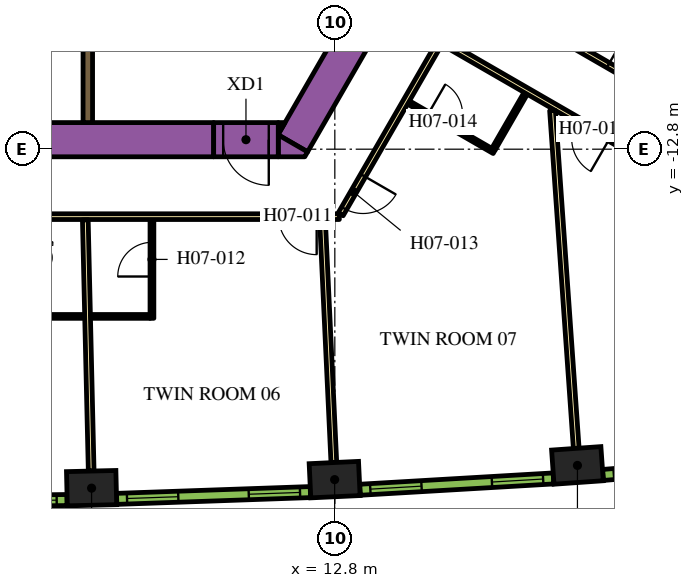
"""IFC4 building model, lengths in metres.
Left out: names, types, materials, properties, quantities, classifications, styles, units other than length and angle.
Written with IfcOpenShell. Run it as: python <this file> out.ifc"""

import sys

from ifc_helpers import new_model, si_unit, direction, frame, frame_2d, origin, origin_2d, place, context, subcontext, project, spatial, polyline, rectangle, outline, extrude, element, fill, save


model = new_model("IFC4")
c1 = context("Model", 3, precision=1e-05, world=origin(), true_north=direction((0.0, 1.0)))
c2 = subcontext(c1, "Body", "Model", "MODEL_VIEW")
j1 = project(units=[si_unit("LENGTHUNIT", "METRE"), si_unit("PLANEANGLEUNIT", "RADIAN")], contexts=[c1])
p1 = place(None, origin())
s1 = spatial("IfcSite", under=j1, at=p1, CompositionType="ELEMENT")
p2 = place(p1, origin())
s2 = spatial("IfcBuilding", under=s1, at=p2, CompositionType="ELEMENT")
p3 = place(p2, frame((0.0, 0.0, 99.3)))
s3 = spatial("IfcBuildingStorey", under=s2, at=p3, CompositionType="ELEMENT", Elevation=99.3)
for number, where, z_axis, x_axis in (
    (1, (6.399, -21.719, 0.0), (0.0, 0.0, 1.0), (1.0, 0.023, 0.0)),
    (2, (12.795, -21.494, 0.0), (0.0, 0.0, 1.0), (0.999, 0.047, 0.0)),
    (3, (19.184, -21.12, 0.0), (0.0, 0.0, 1.0), (0.998, 0.07, 0.0)),
):
    element("IfcColumn", number, at=place(p3, frame(where, z_axis=z_axis, x_axis=x_axis)), inside=s3, PredefinedType="COLUMN", context=c2, shape_type="SweptSolid", body=[
        extrude(rectangle(XDim=1.3, YDim=0.9, at=origin_2d()), origin(), (0.0, 0.0, 1.0), 3.9),
    ])
p4 = place(p3, frame((11.695, -12.644, 0.0), z_axis=(0.0, 0.0, 1.0), x_axis=(0.500010229568, 0.86601949766, 0.0)))
e4 = element("IfcWall", 4, at=p4, inside=s3, PredefinedType="SOLIDWALL", context=c2, shape_type="SweptSolid", body=[
    extrude(rectangle(XDim=9.326, YDim=0.9, at=frame_2d((4.663, 0.0))), origin(), (0.0, 0.0, 1.0), 3.9),
])
p5 = place(p3, origin())
e5 = element("IfcWall", 5, at=p5, inside=s3, PredefinedType="SOLIDWALL", context=c2, shape_type="SweptSolid", body=[
    extrude(outline(polyline([(12.009, -13.0), (11.312, -13.0), (11.312, -12.425), (12.083, -12.871), (12.009, -13.0)])), origin(), (0.0, 0.0, 1.0), 3.9),
])
e6 = element("IfcWall", 6, at=p5, inside=s3, PredefinedType="SOLIDWALL", context=c2, shape_type="SweptSolid", body=[
    extrude(outline(polyline([(11.489, -12.1), (11.312, -12.407), (11.312, -12.1), (11.489, -12.1)])), origin(), (0.0, 0.0, 1.0), 3.9),
])
p6 = place(p3, frame((-12.019, -12.55, 0.0), z_axis=(0.0, 0.0, 1.0), x_axis=(1.0, 0.0, 0.0)))
e7 = element("IfcWall", 7, at=p6, inside=s3, PredefinedType="SOLIDWALL", context=c2, shape_type="SweptSolid", body=[
    extrude(rectangle(XDim=21.63, YDim=0.9, at=frame_2d((10.815, 0.0))), origin(), (0.0, 0.0, 1.0), 3.9),
])
p7 = place(p3, frame((6.3, -8.67, 0.0), z_axis=(0.0, 0.0, 1.0), x_axis=(0.0, -1.0, 0.0)))
e8 = element("IfcWall", 8, at=p7, inside=s3, PredefinedType="SOLIDWALL", context=c2, shape_type="SweptSolid", body=[
    extrude(rectangle(XDim=3.43, YDim=0.25, at=frame_2d((1.715, 0.0))), origin(), (0.0, 0.0, 1.0), 3.9),
])
p8 = place(p3, frame((11.312, -12.55, 0.0), z_axis=(0.0, 0.0, 1.0), x_axis=(-1.0, 0.0, 0.0)))
e9 = element("IfcWall", 9, at=p8, inside=s3, PredefinedType="SOLIDWALL", context=c2, shape_type="SweptSolid", body=[
    extrude(rectangle(XDim=1.7, YDim=0.9, at=frame_2d((0.85, 0.0))), origin(), (0.0, 0.0, 1.0), 3.9),
])
p9 = place(p8, frame((0.25, 0.0, 0.0)))
e10 = element("IfcOpeningElement", 10, at=p9, cuts=e9, PredefinedType="OPENING", context=c2, shape_type="SweptSolid", body=[
    extrude(rectangle(XDim=1.2, YDim=2.1, at=frame_2d((0.6, 1.05))), frame((0.0, 0.46, 0.0), z_axis=(0.0, -1.0, 0.0), x_axis=(1.0, 0.0, 0.0)), (0.0, 0.0, 1.0), 0.92),
])
p10 = place(p3, frame((16.412, -8.523, 0.0), z_axis=(0.0, 0.0, 1.0), x_axis=(0.866025629663, -0.499999608766, 0.0)))
e11 = element("IfcWall", 11, at=p10, inside=s3, PredefinedType="PARTITIONING", context=c2, shape_type="SweptSolid", body=[
    extrude(rectangle(XDim=13.624, YDim=0.15, at=frame_2d((6.812, 0.0))), origin(), (0.0, 0.0, 1.0), 2.75),
])
p11 = place(p10, frame((4.134, 0.0, 0.0)))
e12 = element("IfcOpeningElement", 12, at=p11, cuts=e11, PredefinedType="OPENING", context=c2, shape_type="SweptSolid", body=[
    extrude(rectangle(XDim=1.0, YDim=2.1, at=frame_2d((0.5, 1.05))), frame((0.0, 0.085, 0.0), z_axis=(0.0, -1.0, 0.0), x_axis=(1.0, 0.0, 0.0)), (0.0, 0.0, 1.0), 0.17),
])
p12 = place(p3, frame((12.918, -14.575, 0.0), z_axis=(0.0, 0.0, 1.0), x_axis=(-1.0, 0.0, 0.0)))
e13 = element("IfcWall", 13, at=p12, inside=s3, PredefinedType="PARTITIONING", context=c2, shape_type="SweptSolid", body=[
    extrude(rectangle(XDim=25.766, YDim=0.15, at=frame_2d((12.883, 0.0))), origin(), (0.0, 0.0, 1.0), 2.75),
])
p13 = place(p12, frame((24.24, 0.0, 0.0)))
e14 = element("IfcOpeningElement", 14, at=p13, cuts=e13, PredefinedType="OPENING", context=c2, shape_type="SweptSolid", body=[
    extrude(rectangle(XDim=1.0, YDim=2.1, at=frame_2d((0.5, 1.05))), frame((0.0, 0.085, 0.0), z_axis=(0.0, -1.0, 0.0), x_axis=(1.0, 0.0, 0.0)), (0.0, 0.0, 1.0), 0.17),
])
p14 = place(p12, frame((13.144, 0.0, 0.0)))
e15 = element("IfcOpeningElement", 15, at=p14, cuts=e13, PredefinedType="OPENING", context=c2, shape_type="SweptSolid", body=[
    extrude(rectangle(XDim=1.0, YDim=2.1, at=frame_2d((0.5, 1.05))), frame((0.0, 0.085, 0.0), z_axis=(0.0, -1.0, 0.0), x_axis=(1.0, 0.0, 0.0)), (0.0, 0.0, 1.0), 0.17),
])
p15 = place(p12, frame((11.693, 0.0, 0.0)))
e16 = element("IfcOpeningElement", 16, at=p15, cuts=e13, PredefinedType="OPENING", context=c2, shape_type="SweptSolid", body=[
    extrude(rectangle(XDim=1.0, YDim=2.1, at=frame_2d((0.5, 1.05))), frame((0.0, 0.085, 0.0), z_axis=(0.0, -1.0, 0.0), x_axis=(1.0, 0.0, 0.0)), (0.0, 0.0, 1.0), 0.17),
])
p16 = place(p12, frame((0.596, 0.0, 0.0)))
e17 = element("IfcOpeningElement", 17, at=p16, cuts=e13, PredefinedType="OPENING", context=c2, shape_type="SweptSolid", body=[
    extrude(rectangle(XDim=1.0, YDim=2.1, at=frame_2d((0.5, 1.05))), frame((0.0, 0.085, 0.0), z_axis=(0.0, -1.0, 0.0), x_axis=(1.0, 0.0, 0.0)), (0.0, 0.0, 1.0), 0.17),
])
p17 = place(p3, frame((15.587, -9.952, 0.0), z_axis=(0.0, 0.0, 1.0), x_axis=(-0.500016618951, -0.866015808616, 0.0)))
e18 = element("IfcWall", 18, at=p17, inside=s3, PredefinedType="PARTITIONING", context=c2, shape_type="SweptSolid", body=[
    extrude(rectangle(XDim=5.268, YDim=0.15, at=frame_2d((2.634, 0.0))), origin(), (0.0, 0.0, 1.0), 2.75),
])
p18 = place(p17, frame((4.088, 0.0, 0.0)))
e19 = element("IfcOpeningElement", 19, at=p18, cuts=e18, PredefinedType="OPENING", context=c2, shape_type="SweptSolid", body=[
    extrude(rectangle(XDim=1.0, YDim=2.1, at=frame_2d((0.5, 1.05))), frame((0.0, 0.085, 0.0), z_axis=(0.0, -1.0, 0.0), x_axis=(1.0, 0.0, 0.0)), (0.0, 0.0, 1.0), 0.17),
])
p19 = place(p3, frame((27.386, -16.764, 0.0), z_axis=(0.0, 0.0, 1.0), x_axis=(-0.866022585856, 0.500004880763, 0.0)))
e20 = element("IfcWall", 20, at=p19, inside=s3, PredefinedType="PARTITIONING", context=c2, shape_type="SweptSolid", body=[
    extrude(rectangle(XDim=13.544, YDim=0.15, at=frame_2d((6.772, 0.0))), origin(), (0.0, 0.0, 1.0), 2.75),
])
p20 = place(p19, frame((8.491, 0.0, 0.0)))
e21 = element("IfcOpeningElement", 21, at=p20, cuts=e20, PredefinedType="OPENING", context=c2, shape_type="SweptSolid", body=[
    extrude(rectangle(XDim=1.0, YDim=2.1, at=frame_2d((0.5, 1.05))), frame((0.0, 0.085, 0.0), z_axis=(0.0, -1.0, 0.0), x_axis=(1.0, 0.0, 0.0)), (0.0, 0.0, 1.0), 0.17),
])
p21 = place(p3, frame((6.389, -21.269, 0.0), z_axis=(0.0, 0.0, 1.0), x_axis=(-0.023377429176, 0.999726710559, 0.0)))
e22 = element("IfcWall", 22, at=p21, inside=s3, PredefinedType="PARTITIONING", context=c2, shape_type="SweptSolid", body=[
    extrude(rectangle(XDim=6.611, YDim=0.15, at=frame_2d((3.305, 0.0))), origin(), (0.0, 0.0, 1.0), 2.75),
])
p22 = place(p3, frame((12.774, -21.045, 0.0), z_axis=(0.0, 0.0, 1.0), x_axis=(-0.046750341626, 0.998906605023, 0.0)))
e23 = element("IfcWall", 23, at=p22, inside=s3, PredefinedType="PARTITIONING", context=c2, shape_type="SweptSolid", body=[
    extrude(rectangle(XDim=6.392, YDim=0.15, at=frame_2d((3.196, 0.0))), origin(), (0.0, 0.0, 1.0), 2.75),
])
p23 = place(p3, frame((19.153, -20.671, 0.0), z_axis=(0.0, 0.0, 1.0), x_axis=(-0.070070736723, 0.997542025107, 0.0)))
e24 = element("IfcWall", 24, at=p23, inside=s3, PredefinedType="PARTITIONING", context=c2, shape_type="SweptSolid", body=[
    extrude(rectangle(XDim=8.909, YDim=0.15, at=frame_2d((4.455, 0.0))), origin(), (0.0, 0.0, 1.0), 2.75),
])
p24 = place(p3, frame((4.53, -17.2, 0.0), z_axis=(0.0, 0.0, 1.0), x_axis=(1.0, 0.0, 0.0)))
e25 = element("IfcWall", 25, at=p24, inside=s3, PredefinedType="PARTITIONING", context=c2, shape_type="SweptSolid", body=[
    extrude(rectangle(XDim=1.68, YDim=0.1, at=frame_2d((0.84, 0.0))), origin(), (0.0, 0.0, 1.0), 2.75),
])
p25 = place(p3, frame((7.988, -17.25, 0.0), z_axis=(0.0, 0.0, 1.0), x_axis=(0.0, 1.0, 0.0)))
e26 = element("IfcWall", 26, at=p25, inside=s3, PredefinedType="PARTITIONING", context=c2, shape_type="SweptSolid", body=[
    extrude(rectangle(XDim=2.6, YDim=0.1, at=frame_2d((1.3, 0.0))), origin(), (0.0, 0.0, 1.0), 2.75),
])
p26 = place(p25, frame((1.1, 0.0, 0.0)))
e27 = element("IfcOpeningElement", 27, at=p26, cuts=e26, PredefinedType="OPENING", context=c2, shape_type="SweptSolid", body=[
    extrude(rectangle(XDim=0.9, YDim=2.1, at=frame_2d((0.45, 1.05))), frame((0.0, 0.06, 0.0), z_axis=(0.0, -1.0, 0.0), x_axis=(1.0, 0.0, 0.0)), (0.0, 0.0, 1.0), 0.12),
])
p27 = place(p3, frame((7.938, -17.2, 0.0), z_axis=(0.0, 0.0, 1.0), x_axis=(-1.0, 0.0, 0.0)))
e28 = element("IfcWall", 28, at=p27, inside=s3, PredefinedType="PARTITIONING", context=c2, shape_type="SweptSolid", body=[
    extrude(rectangle(XDim=1.56, YDim=0.1, at=frame_2d((0.78, 0.0))), origin(), (0.0, 0.0, 1.0), 2.75),
])
p28 = place(p3, frame((14.74, -11.57, 0.0), z_axis=(0.0, 0.0, 1.0), x_axis=(0.866021400173, -0.500006934395, 0.0)))
e29 = element("IfcWall", 29, at=p28, inside=s3, PredefinedType="PARTITIONING", context=c2, shape_type="SweptSolid", body=[
    extrude(rectangle(XDim=2.6, YDim=0.1, at=frame_2d((1.3, 0.0))), origin(), (0.0, 0.0, 1.0), 2.75),
])
p29 = place(p28, frame((0.6, 0.0, 0.0)))
e30 = element("IfcOpeningElement", 30, at=p29, cuts=e29, PredefinedType="OPENING", context=c2, shape_type="SweptSolid", body=[
    extrude(rectangle(XDim=0.9, YDim=2.1, at=frame_2d((0.45, 1.05))), frame((0.0, 0.06, 0.0), z_axis=(0.0, -1.0, 0.0), x_axis=(1.0, 0.0, 0.0)), (0.0, 0.0, 1.0), 0.12),
])
p30 = place(p3, frame((16.978, -12.793, 0.0), z_axis=(0.0, 0.0, 1.0), x_axis=(0.500147619332, 0.865940158947, 0.0)))
e31 = element("IfcWall", 31, at=p30, inside=s3, PredefinedType="PARTITIONING", context=c2, shape_type="SweptSolid", body=[
    extrude(rectangle(XDim=1.69, YDim=0.1, at=frame_2d((0.845, 0.0))), origin(), (0.0, 0.0, 1.0), 2.75),
])
p31 = place(p3, frame((0.653, -22.091, 0.0), z_axis=(0.0, 0.0, 1.0), x_axis=(0.999931786565, 0.011679992145, 0.0)))
e32 = element("IfcWall", 32, at=p31, inside=s3, PredefinedType="SOLIDWALL", context=c2, shape_type="SweptSolid", body=[
    extrude(rectangle(XDim=5.1, YDim=0.29, at=frame_2d((2.55, 0.0))), origin(), (0.0, 0.0, 1.0), 3.65),
])
p32 = place(p31, frame((0.273, 0.0, 0.9)))
e33 = element("IfcOpeningElement", 33, at=p32, cuts=e32, PredefinedType="OPENING", context=c2, shape_type="SweptSolid", body=[
    extrude(rectangle(XDim=1.35, YDim=2.15, at=frame_2d((0.675, 1.075))), frame((0.0, 0.155, 0.0), z_axis=(0.0, -1.0, 0.0), x_axis=(1.0, 0.0, 0.0)), (0.0, 0.0, 1.0), 0.31),
])
p33 = place(p31, frame((3.478, 0.0, 0.9)))
e34 = element("IfcOpeningElement", 34, at=p33, cuts=e32, PredefinedType="OPENING", context=c2, shape_type="SweptSolid", body=[
    extrude(rectangle(XDim=1.35, YDim=2.15, at=frame_2d((0.675, 1.075))), frame((0.0, 0.155, 0.0), z_axis=(0.0, -1.0, 0.0), x_axis=(1.0, 0.0, 0.0)), (0.0, 0.0, 1.0), 0.31),
])
p34 = place(p3, frame((7.059, -22.001, 0.0), z_axis=(0.0, 0.0, 1.0), x_axis=(0.999385993957, 0.035037623812, 0.0)))
e35 = element("IfcWall", 35, at=p34, inside=s3, PredefinedType="SOLIDWALL", context=c2, shape_type="SweptSolid", body=[
    extrude(rectangle(XDim=5.101, YDim=0.29, at=frame_2d((2.55, 0.0))), origin(), (0.0, 0.0, 1.0), 3.65),
])
p35 = place(p34, frame((0.273, 0.0, 0.9)))
e36 = element("IfcOpeningElement", 36, at=p35, cuts=e35, PredefinedType="OPENING", context=c2, shape_type="SweptSolid", body=[
    extrude(rectangle(XDim=1.35, YDim=2.15, at=frame_2d((0.675, 1.075))), frame((0.0, 0.155, 0.0), z_axis=(0.0, -1.0, 0.0), x_axis=(1.0, 0.0, 0.0)), (0.0, 0.0, 1.0), 0.31),
])
p36 = place(p34, frame((3.478, 0.0, 0.9)))
e37 = element("IfcOpeningElement", 37, at=p36, cuts=e35, PredefinedType="OPENING", context=c2, shape_type="SweptSolid", body=[
    extrude(rectangle(XDim=1.35, YDim=2.15, at=frame_2d((0.675, 1.075))), frame((0.0, 0.155, 0.0), z_axis=(0.0, -1.0, 0.0), x_axis=(1.0, 0.0, 0.0)), (0.0, 0.0, 1.0), 0.31),
])
p37 = place(p3, frame((13.462, -21.761, 0.0), z_axis=(0.0, 0.0, 1.0), x_axis=(0.998290511436, 0.058447025388, 0.0)))
e38 = element("IfcWall", 38, at=p37, inside=s3, PredefinedType="SOLIDWALL", context=c2, shape_type="SweptSolid", body=[
    extrude(rectangle(XDim=5.1, YDim=0.29, at=frame_2d((2.55, 0.0))), origin(), (0.0, 0.0, 1.0), 3.65),
])
p38 = place(p37, frame((0.272, 0.0, 0.9)))
e39 = element("IfcOpeningElement", 39, at=p38, cuts=e38, PredefinedType="OPENING", context=c2, shape_type="SweptSolid", body=[
    extrude(rectangle(XDim=1.35, YDim=2.15, at=frame_2d((0.675, 1.075))), frame((0.0, 0.155, 0.0), z_axis=(0.0, -1.0, 0.0), x_axis=(1.0, 0.0, 0.0)), (0.0, 0.0, 1.0), 0.31),
])
p39 = place(p37, frame((3.478, 0.0, 0.9)))
e40 = element("IfcOpeningElement", 40, at=p39, cuts=e38, PredefinedType="OPENING", context=c2, shape_type="SweptSolid", body=[
    extrude(rectangle(XDim=1.35, YDim=2.15, at=frame_2d((0.675, 1.075))), frame((0.0, 0.155, 0.0), z_axis=(0.0, -1.0, 0.0), x_axis=(1.0, 0.0, 0.0)), (0.0, 0.0, 1.0), 0.31),
])
p40 = place(p3, frame((19.857, -21.371, 0.0), z_axis=(0.0, 0.0, 1.0), x_axis=(0.99665273362, 0.081751627308, 0.0)))
e41 = element("IfcWall", 41, at=p40, inside=s3, PredefinedType="SOLIDWALL", context=c2, shape_type="SweptSolid", body=[
    extrude(rectangle(XDim=5.107, YDim=0.29, at=frame_2d((2.553, 0.0))), origin(), (0.0, 0.0, 1.0), 3.65),
])
p41 = place(p40, frame((0.285, 0.0, 0.9)))
e42 = element("IfcOpeningElement", 42, at=p41, cuts=e41, PredefinedType="OPENING", context=c2, shape_type="SweptSolid", body=[
    extrude(rectangle(XDim=1.35, YDim=2.15, at=frame_2d((0.675, 1.075))), frame((0.0, 0.155, 0.0), z_axis=(0.0, -1.0, 0.0), x_axis=(1.0, 0.0, 0.0)), (0.0, 0.0, 1.0), 0.31),
])
p42 = place(p40, frame((3.516, 0.0, 0.9)))
e43 = element("IfcOpeningElement", 43, at=p42, cuts=e41, PredefinedType="OPENING", context=c2, shape_type="SweptSolid", body=[
    extrude(rectangle(XDim=1.35, YDim=2.15, at=frame_2d((0.675, 1.075))), frame((0.0, 0.155, 0.0), z_axis=(0.0, -1.0, 0.0), x_axis=(1.0, 0.0, 0.0)), (0.0, 0.0, 1.0), 0.31),
])
p43 = place(p9, origin())
e44 = element("IfcDoor", 44, at=p43, inside=s3, OperationType="SINGLE_SWING_LEFT", PredefinedType="DOOR", context=c2, shape_type="SweptSolid", body=[
    extrude(rectangle(XDim=1.2, YDim=2.1, at=frame_2d((0.6, 1.05))), frame((0.0, 0.025, 0.0), z_axis=(0.0, -1.0, 0.0), x_axis=(1.0, 0.0, 0.0)), (0.0, 0.0, 1.0), 0.05),
])
fill(e10, e44)
p44 = place(p16, origin())
e45 = element("IfcDoor", 45, at=p44, inside=s3, OperationType="SINGLE_SWING_LEFT", PredefinedType="DOOR", context=c2, shape_type="SweptSolid", body=[
    extrude(rectangle(XDim=1.0, YDim=2.1, at=frame_2d((0.5, 1.05))), frame((0.0, 0.025, 0.0), z_axis=(0.0, -1.0, 0.0), x_axis=(1.0, 0.0, 0.0)), (0.0, 0.0, 1.0), 0.05),
])
fill(e17, e45)
p45 = place(p26, origin())
e46 = element("IfcDoor", 46, at=p45, inside=s3, OperationType="SINGLE_SWING_RIGHT", PredefinedType="DOOR", context=c2, shape_type="SweptSolid", body=[
    extrude(rectangle(XDim=0.9, YDim=2.1, at=frame_2d((0.45, 1.05))), frame((0.0, 0.025, 0.0), z_axis=(0.0, -1.0, 0.0), x_axis=(1.0, 0.0, 0.0)), (0.0, 0.0, 1.0), 0.05),
])
fill(e27, e46)
p46 = place(p18, origin())
e47 = element("IfcDoor", 47, at=p46, inside=s3, OperationType="SINGLE_SWING_RIGHT", PredefinedType="DOOR", context=c2, shape_type="SweptSolid", body=[
    extrude(rectangle(XDim=1.0, YDim=2.1, at=frame_2d((0.5, 1.05))), frame((0.0, 0.025, 0.0), z_axis=(0.0, -1.0, 0.0), x_axis=(1.0, 0.0, 0.0)), (0.0, 0.0, 1.0), 0.05),
])
fill(e19, e47)
p47 = place(p29, origin())
e48 = element("IfcDoor", 48, at=p47, inside=s3, OperationType="SINGLE_SWING_LEFT", PredefinedType="DOOR", context=c2, shape_type="SweptSolid", body=[
    extrude(rectangle(XDim=0.9, YDim=2.1, at=frame_2d((0.45, 1.05))), frame((0.0, 0.025, 0.0), z_axis=(0.0, -1.0, 0.0), x_axis=(1.0, 0.0, 0.0)), (0.0, 0.0, 1.0), 0.05),
])
fill(e30, e48)
p48 = place(p20, origin())
e49 = element("IfcDoor", 49, at=p48, inside=s3, OperationType="SINGLE_SWING_RIGHT", PredefinedType="DOOR", context=c2, shape_type="SweptSolid", body=[
    extrude(rectangle(XDim=1.0, YDim=2.1, at=frame_2d((0.5, 1.05))), frame((0.0, 0.025, 0.0), z_axis=(0.0, -1.0, 0.0), x_axis=(1.0, 0.0, 0.0)), (0.0, 0.0, 1.0), 0.05),
])
fill(e21, e49)
p49 = place(p11, origin())
e50 = element("IfcDoor", 50, at=p49, inside=s3, OperationType="SINGLE_SWING_LEFT", PredefinedType="DOOR", context=c2, shape_type="SweptSolid", body=[
    extrude(rectangle(XDim=1.0, YDim=2.1, at=frame_2d((0.5, 1.05))), frame((0.0, 0.025, 0.0), z_axis=(0.0, -1.0, 0.0), x_axis=(1.0, 0.0, 0.0)), (0.0, 0.0, 1.0), 0.05),
])
fill(e12, e50)
p50 = place(p33, origin())
e51 = element("IfcWindow", 51, at=p50, inside=s3, PartitioningType="DOUBLE_PANEL_VERTICAL", PredefinedType="WINDOW", context=c2, shape_type="SweptSolid", body=[
    extrude(rectangle(XDim=1.35, YDim=2.15, at=frame_2d((0.675, 1.075))), frame((0.0, 0.015, 0.0), z_axis=(0.0, -1.0, 0.0), x_axis=(1.0, 0.0, 0.0)), (0.0, 0.0, 1.0), 0.06),
])
fill(e34, e51)
p51 = place(p35, origin())
e52 = element("IfcWindow", 52, at=p51, inside=s3, PartitioningType="DOUBLE_PANEL_VERTICAL", PredefinedType="WINDOW", context=c2, shape_type="SweptSolid", body=[
    extrude(rectangle(XDim=1.35, YDim=2.15, at=frame_2d((0.675, 1.075))), frame((0.0, 0.015, 0.0), z_axis=(0.0, -1.0, 0.0), x_axis=(1.0, 0.0, 0.0)), (0.0, 0.0, 1.0), 0.06),
])
fill(e36, e52)
p52 = place(p36, origin())
e53 = element("IfcWindow", 53, at=p52, inside=s3, PartitioningType="DOUBLE_PANEL_VERTICAL", PredefinedType="WINDOW", context=c2, shape_type="SweptSolid", body=[
    extrude(rectangle(XDim=1.35, YDim=2.15, at=frame_2d((0.675, 1.075))), frame((0.0, 0.015, 0.0), z_axis=(0.0, -1.0, 0.0), x_axis=(1.0, 0.0, 0.0)), (0.0, 0.0, 1.0), 0.06),
])
fill(e37, e53)
p53 = place(p38, origin())
e54 = element("IfcWindow", 54, at=p53, inside=s3, PartitioningType="DOUBLE_PANEL_VERTICAL", PredefinedType="WINDOW", context=c2, shape_type="SweptSolid", body=[
    extrude(rectangle(XDim=1.35, YDim=2.15, at=frame_2d((0.675, 1.075))), frame((0.0, 0.015, 0.0), z_axis=(0.0, -1.0, 0.0), x_axis=(1.0, 0.0, 0.0)), (0.0, 0.0, 1.0), 0.06),
])
fill(e39, e54)
p54 = place(p39, origin())
e55 = element("IfcWindow", 55, at=p54, inside=s3, PartitioningType="DOUBLE_PANEL_VERTICAL", PredefinedType="WINDOW", context=c2, shape_type="SweptSolid", body=[
    extrude(rectangle(XDim=1.35, YDim=2.15, at=frame_2d((0.675, 1.075))), frame((0.0, 0.015, 0.0), z_axis=(0.0, -1.0, 0.0), x_axis=(1.0, 0.0, 0.0)), (0.0, 0.0, 1.0), 0.06),
])
fill(e40, e55)
p55 = place(p41, origin())
e56 = element("IfcWindow", 56, at=p55, inside=s3, PartitioningType="DOUBLE_PANEL_VERTICAL", PredefinedType="WINDOW", context=c2, shape_type="SweptSolid", body=[
    extrude(rectangle(XDim=1.35, YDim=2.15, at=frame_2d((0.675, 1.075))), frame((0.0, 0.015, 0.0), z_axis=(0.0, -1.0, 0.0), x_axis=(1.0, 0.0, 0.0)), (0.0, 0.0, 1.0), 0.06),
])
fill(e42, e56)
save(model, sys.argv[1])
